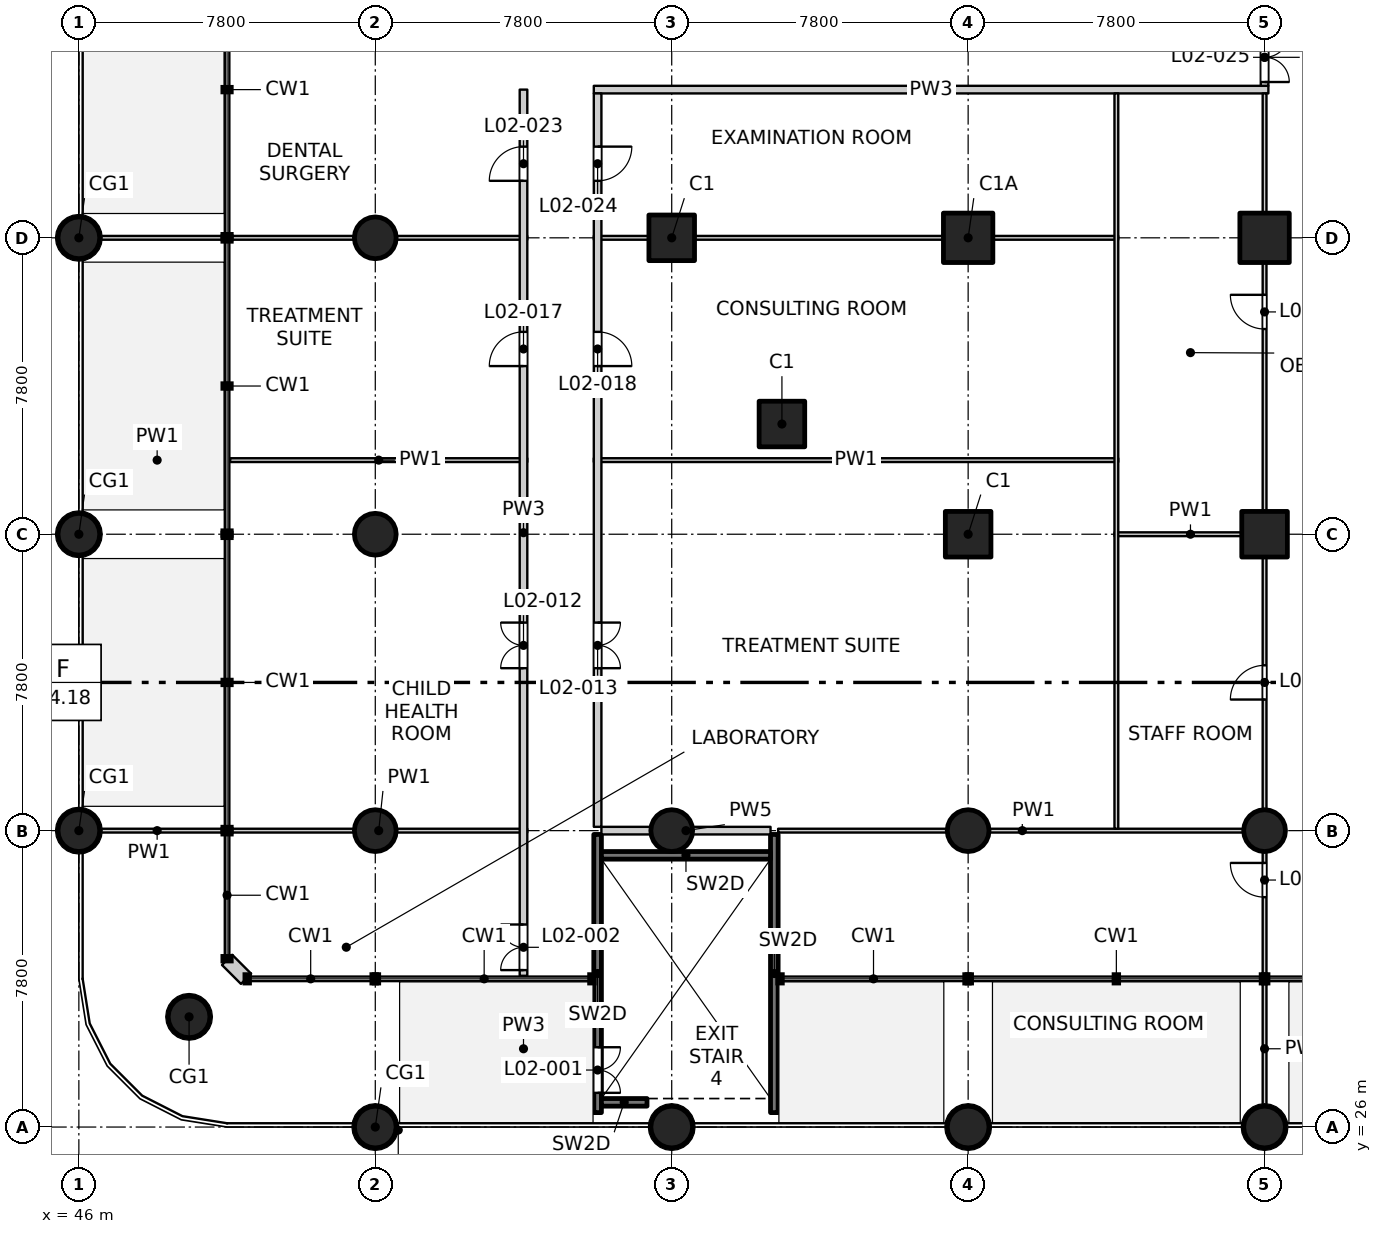
"""IFC4 building model, lengths in metres.
Left out: names, types, materials, properties, quantities, classifications, styles, units other than length and angle.
Written with IfcOpenShell. Run it as: python <this file> out.ifc"""

import sys

from ifc_helpers import new_model, si_unit, direction, frame, frame_2d, origin, origin_2d, place, context, subcontext, project, spatial, rectangle, circle, extrude, element, fill, save


model = new_model("IFC4")
c1 = context("Model", 3, precision=1e-05, world=origin(), true_north=direction((0.0, 1.0)))
c2 = subcontext(c1, "Body", "Model", "MODEL_VIEW")
j1 = project(units=[si_unit("LENGTHUNIT", "METRE"), si_unit("PLANEANGLEUNIT", "RADIAN")], contexts=[c1])
p1 = place(None, origin())
s1 = spatial("IfcSite", under=j1, at=p1, CompositionType="ELEMENT")
p2 = place(p1, origin())
s2 = spatial("IfcBuilding", under=s1, at=p2, CompositionType="ELEMENT")
p3 = place(p2, frame((0.0, 0.0, 10.5)))
s3 = spatial("IfcBuildingStorey", under=s2, at=p3, CompositionType="ELEMENT", Elevation=10.5)
for number, where, z_axis, x_axis in (
    (1, (64.5, 44.5, -0.3), (0.0, 0.0, 1.0), (1.0, 0.0, 0.0)),
    (2, (61.6, 49.4, -0.3), (0.0, 0.0, 1.0), (1.0, 0.0, 0.0)),
    (3, (69.4, 41.6, -0.3), (0.0, 0.0, 1.0), (1.0, 0.0, 0.0)),
    (4, (77.2, 41.6, -0.3), (0.0, 0.0, 1.0), (1.0, 0.0, 0.0)),
):
    element("IfcColumn", number, at=place(p3, frame(where, z_axis=z_axis, x_axis=x_axis)), inside=s3, PredefinedType="COLUMN", context=c2, shape_type="SweptSolid", body=[
        extrude(rectangle(XDim=1.2, YDim=1.2, at=origin_2d()), origin(), (0.0, 0.0, 1.0), 4.45),
    ])
for number, where, z_axis, x_axis in (
    (5, (69.4, 49.4, -0.3), (0.0, 0.0, 1.0), (1.0, 0.0, 0.0)),
    (6, (77.2, 49.4, -0.3), (0.0, 0.0, 1.0), (1.0, 0.0, 0.0)),
):
    element("IfcColumn", number, at=place(p3, frame(where, z_axis=z_axis, x_axis=x_axis)), inside=s3, PredefinedType="COLUMN", context=c2, shape_type="SweptSolid", body=[
        extrude(rectangle(XDim=1.3, YDim=1.3, at=origin_2d()), origin(), (0.0, 0.0, 1.0), 4.45),
    ])
for number, where, z_axis, x_axis in (
    (7, (48.9, 28.9, -0.3), (0.0, 0.0, 1.0), (1.0, 0.0, 0.0)),
    (8, (46.0, 33.8, -0.3), (0.0, 0.0, 1.0), (1.0, 0.0, 0.0)),
    (9, (46.0, 41.6, -0.3), (0.0, 0.0, 1.0), (1.0, 0.0, 0.0)),
    (10, (46.0, 49.4, -0.3), (0.0, 0.0, 1.0), (1.0, 0.0, 0.0)),
    (11, (53.8, 26.0, -0.3), (0.0, 0.0, 1.0), (1.0, 0.0, 0.0)),
    (12, (53.8, 33.8, -0.3), (0.0, 0.0, 1.0), (1.0, 0.0, 0.0)),
    (13, (53.8, 41.6, -0.3), (0.0, 0.0, 1.0), (1.0, 0.0, 0.0)),
    (14, (53.8, 49.4, -0.3), (0.0, 0.0, 1.0), (1.0, 0.0, 0.0)),
    (15, (61.6, 26.0, -0.3), (0.0, 0.0, 1.0), (1.0, 0.0, 0.0)),
    (16, (61.6, 33.8, -0.3), (0.0, 0.0, 1.0), (1.0, 0.0, 0.0)),
    (17, (69.4, 26.0, -0.3), (0.0, 0.0, 1.0), (1.0, 0.0, 0.0)),
    (18, (69.4, 33.8, -0.3), (0.0, 0.0, 1.0), (1.0, 0.0, 0.0)),
    (19, (77.2, 26.0, -0.3), (0.0, 0.0, 1.0), (1.0, 0.0, 0.0)),
    (20, (77.2, 33.8, -0.3), (0.0, 0.0, 1.0), (1.0, 0.0, 0.0)),
):
    element("IfcColumn", number, at=place(p3, frame(where, z_axis=z_axis, x_axis=x_axis)), inside=s3, PredefinedType="COLUMN", context=c2, shape_type="SweptSolid", body=[
        extrude(circle(Radius=0.55, at=origin_2d()), origin(), (0.0, 0.0, 1.0), 4.45),
    ])
p4 = place(p3, frame((59.65, 26.38, 0.0), z_axis=(0.0, 0.0, 1.0), x_axis=(0.0, 1.0, 0.0)))
e21 = element("IfcWall", 21, at=p4, inside=s3, PredefinedType="SOLIDWALL", context=c2, shape_type="SweptSolid", body=[
    extrude(rectangle(XDim=7.32, YDim=0.2, at=frame_2d((3.66, 0.0))), origin(), (0.0, 0.0, 1.0), 4.15),
])
p5 = place(p4, frame((0.52, 0.0, 0.0)))
e22 = element("IfcOpeningElement", 22, at=p5, cuts=e21, PredefinedType="OPENING", context=c2, shape_type="SweptSolid", body=[
    extrude(rectangle(XDim=1.2, YDim=2.1, at=frame_2d((0.6, 1.05))), frame((0.0, 0.11, 0.0), z_axis=(0.0, -1.0, 0.0), x_axis=(1.0, 0.0, 0.0)), (0.0, 0.0, 1.0), 0.22),
])
p6 = place(p3, frame((64.3, 26.38, 0.0), z_axis=(0.0, 0.0, 1.0), x_axis=(0.0, 1.0, 0.0)))
e23 = element("IfcWall", 23, at=p6, inside=s3, PredefinedType="SOLIDWALL", context=c2, shape_type="SweptSolid", body=[
    extrude(rectangle(XDim=7.32, YDim=0.2, at=frame_2d((3.66, 0.0))), origin(), (0.0, 0.0, 1.0), 4.15),
])
p7 = place(p3, frame((59.75, 33.15, 0.0), z_axis=(0.0, 0.0, 1.0), x_axis=(1.0, 0.0, 0.0)))
e24 = element("IfcWall", 24, at=p7, inside=s3, PredefinedType="SOLIDWALL", context=c2, shape_type="SweptSolid", body=[
    extrude(rectangle(XDim=4.45, YDim=0.2, at=frame_2d((2.225, 0.0))), origin(), (0.0, 0.0, 1.0), 4.15),
])
p8 = place(p3, frame((59.75, 26.65, 0.0), z_axis=(0.0, 0.0, 1.0), x_axis=(1.0, 0.0, 0.0)))
e25 = element("IfcWall", 25, at=p8, inside=s3, PredefinedType="SOLIDWALL", context=c2, shape_type="SweptSolid", body=[
    extrude(rectangle(XDim=1.2, YDim=0.2, at=frame_2d((0.6, 0.0))), origin(), (0.0, 0.0, 1.0), 4.15),
])
p9 = place(p3, frame((50.4, 29.9, 0.0), z_axis=(0.0, 0.0, 1.0), x_axis=(-0.707106781187, 0.707106781187, 0.0)))
e26 = element("IfcWall", 26, at=p9, inside=s3, PredefinedType="SOLIDWALL", context=c2, shape_type="SweptSolid", body=[
    extrude(rectangle(XDim=0.707, YDim=0.38, at=frame_2d((0.354, 0.0))), origin(), (0.0, 0.0, 1.0), 3.7),
])
p10 = place(p3, frame((46.3, 33.8, 0.0), z_axis=(0.0, 0.0, 1.0), x_axis=(1.0, 0.0, 0.0)))
e27 = element("IfcWall", 27, at=p10, inside=s3, PredefinedType="PARTITIONING", context=c2, shape_type="SweptSolid", body=[
    extrude(rectangle(XDim=3.52, YDim=0.1, at=frame_2d((1.76, 0.0))), origin(), (0.0, 0.0, 1.0), 4.15),
])
p11 = place(p3, frame((49.98, 33.8, 0.0), z_axis=(0.0, 0.0, 1.0), x_axis=(1.0, 0.0, 0.0)))
e28 = element("IfcWall", 28, at=p11, inside=s3, PredefinedType="PARTITIONING", context=c2, shape_type="SweptSolid", body=[
    extrude(rectangle(XDim=7.82, YDim=0.1, at=frame_2d((3.91, 0.0))), origin(), (0.0, 0.0, 1.0), 4.15),
])
p12 = place(p3, frame((59.75, 33.8, 0.0), z_axis=(0.0, 0.0, 1.0), x_axis=(1.0, 0.0, 0.0)))
e29 = element("IfcWall", 29, at=p12, inside=s3, PredefinedType="PARTITIONING", context=c2, shape_type="SweptSolid", body=[
    extrude(rectangle(XDim=4.45, YDim=0.2, at=frame_2d((2.225, 0.0))), origin(), (0.0, 0.0, 1.0), 4.15),
])
p13 = place(p3, frame((64.4, 33.8, 0.0), z_axis=(0.0, 0.0, 1.0), x_axis=(1.0, 0.0, 0.0)))
e30 = element("IfcWall", 30, at=p13, inside=s3, PredefinedType="PARTITIONING", context=c2, shape_type="SweptSolid", body=[
    extrude(rectangle(XDim=12.85, YDim=0.1, at=frame_2d((6.425, 0.0))), origin(), (0.0, 0.0, 1.0), 4.15),
])
p14 = place(p3, frame((73.25, 41.6, 0.0), z_axis=(0.0, 0.0, 1.0), x_axis=(1.0, 0.0, 0.0)))
e31 = element("IfcWall", 31, at=p14, inside=s3, PredefinedType="PARTITIONING", context=c2, shape_type="SweptSolid", body=[
    extrude(rectangle(XDim=4.0, YDim=0.1, at=frame_2d((2.0, 0.0))), origin(), (0.0, 0.0, 1.0), 3.7),
])
p15 = place(p3, frame((46.3, 43.55, 0.0), z_axis=(0.0, 0.0, 1.0), x_axis=(1.0, 0.0, 0.0)))
e32 = element("IfcWall", 32, at=p15, inside=s3, PredefinedType="PARTITIONING", context=c2, shape_type="SweptSolid", body=[
    extrude(rectangle(XDim=3.52, YDim=0.1, at=frame_2d((1.76, 0.0))), origin(), (0.0, 0.0, 1.0), 4.15),
])
p16 = place(p3, frame((49.98, 43.55, 0.0), z_axis=(0.0, 0.0, 1.0), x_axis=(1.0, 0.0, 0.0)))
e33 = element("IfcWall", 33, at=p16, inside=s3, PredefinedType="PARTITIONING", context=c2, shape_type="SweptSolid", body=[
    extrude(rectangle(XDim=7.82, YDim=0.1, at=frame_2d((3.91, 0.0))), origin(), (0.0, 0.0, 1.0), 4.15),
])
p17 = place(p3, frame((59.55, 43.55, 0.0), z_axis=(0.0, 0.0, 1.0), x_axis=(1.0, 0.0, 0.0)))
e34 = element("IfcWall", 34, at=p17, inside=s3, PredefinedType="PARTITIONING", context=c2, shape_type="SweptSolid", body=[
    extrude(rectangle(XDim=13.8, YDim=0.1, at=frame_2d((6.9, 0.0))), origin(), (0.0, 0.0, 1.0), 4.15),
])
p18 = place(p3, frame((46.3, 49.4, 0.0), z_axis=(0.0, 0.0, 1.0), x_axis=(1.0, 0.0, 0.0)))
e35 = element("IfcWall", 35, at=p18, inside=s3, PredefinedType="PARTITIONING", context=c2, shape_type="SweptSolid", body=[
    extrude(rectangle(XDim=3.52, YDim=0.1, at=frame_2d((1.76, 0.0))), origin(), (0.0, 0.0, 1.0), 4.15),
])
p19 = place(p3, frame((49.98, 49.4, 0.0), z_axis=(0.0, 0.0, 1.0), x_axis=(1.0, 0.0, 0.0)))
e36 = element("IfcWall", 36, at=p19, inside=s3, PredefinedType="PARTITIONING", context=c2, shape_type="SweptSolid", body=[
    extrude(rectangle(XDim=7.82, YDim=0.1, at=frame_2d((3.91, 0.0))), origin(), (0.0, 0.0, 1.0), 4.15),
])
p20 = place(p3, frame((59.55, 49.4, 0.0), z_axis=(0.0, 0.0, 1.0), x_axis=(1.0, 0.0, 0.0)))
e37 = element("IfcWall", 37, at=p20, inside=s3, PredefinedType="PARTITIONING", context=c2, shape_type="SweptSolid", body=[
    extrude(rectangle(XDim=13.8, YDim=0.1, at=frame_2d((6.9, 0.0))), origin(), (0.0, 0.0, 1.0), 4.15),
])
p21 = place(p3, frame((59.55, 53.3, 0.0), z_axis=(0.0, 0.0, 1.0), x_axis=(1.0, 0.0, 0.0)))
e38 = element("IfcWall", 38, at=p21, inside=s3, PredefinedType="PARTITIONING", context=c2, shape_type="SweptSolid", body=[
    extrude(rectangle(XDim=17.75, YDim=0.2, at=frame_2d((8.875, 0.0))), origin(), (0.0, 0.0, 1.0), 4.15),
])
p22 = place(p3, frame((57.7, 26.3, 0.0), z_axis=(0.0, 0.0, 1.0), x_axis=(0.0, 1.0, 0.0)))
e39 = element("IfcWall", 39, at=p22, inside=s3, PredefinedType="PARTITIONING", context=c2, shape_type="SweptSolid", body=[
    extrude(rectangle(XDim=3.52, YDim=0.2, at=frame_2d((1.76, 0.0))), origin(), (0.0, 0.0, 1.0), 4.15),
])
p23 = place(p3, frame((57.7, 29.98, 0.0), z_axis=(0.0, 0.0, 1.0), x_axis=(0.0, 1.0, 0.0)))
e40 = element("IfcWall", 40, at=p23, inside=s3, PredefinedType="PARTITIONING", context=c2, shape_type="SweptSolid", body=[
    extrude(rectangle(XDim=23.32, YDim=0.2, at=frame_2d((11.66, 0.0))), origin(), (0.0, 0.0, 1.0), 4.15),
])
p24 = place(p23, frame((0.15, 0.0, 0.0)))
e41 = element("IfcOpeningElement", 41, at=p24, cuts=e40, PredefinedType="OPENING", context=c2, shape_type="SweptSolid", body=[
    extrude(rectangle(XDim=1.2, YDim=2.1, at=frame_2d((0.6, 1.05))), frame((0.0, 0.11, 0.0), z_axis=(0.0, -1.0, 0.0), x_axis=(1.0, 0.0, 0.0)), (0.0, 0.0, 1.0), 0.22),
])
p25 = place(p23, frame((8.095, 0.0, 0.0)))
e42 = element("IfcOpeningElement", 42, at=p25, cuts=e40, PredefinedType="OPENING", context=c2, shape_type="SweptSolid", body=[
    extrude(rectangle(XDim=1.2, YDim=2.1, at=frame_2d((0.6, 1.05))), frame((0.0, 0.11, 0.0), z_axis=(0.0, -1.0, 0.0), x_axis=(1.0, 0.0, 0.0)), (0.0, 0.0, 1.0), 0.22),
])
p26 = place(p23, frame((16.045, 0.0, 0.0)))
e43 = element("IfcOpeningElement", 43, at=p26, cuts=e40, PredefinedType="OPENING", context=c2, shape_type="SweptSolid", body=[
    extrude(rectangle(XDim=0.9, YDim=2.1, at=frame_2d((0.45, 1.05))), frame((0.0, 0.11, 0.0), z_axis=(0.0, -1.0, 0.0), x_axis=(1.0, 0.0, 0.0)), (0.0, 0.0, 1.0), 0.22),
])
p27 = place(p23, frame((20.92, 0.0, 0.0)))
e44 = element("IfcOpeningElement", 44, at=p27, cuts=e40, PredefinedType="OPENING", context=c2, shape_type="SweptSolid", body=[
    extrude(rectangle(XDim=0.9, YDim=2.1, at=frame_2d((0.45, 1.05))), frame((0.0, 0.11, 0.0), z_axis=(0.0, -1.0, 0.0), x_axis=(1.0, 0.0, 0.0)), (0.0, 0.0, 1.0), 0.22),
])
p28 = place(p3, frame((59.65, 33.9, 0.0), z_axis=(0.0, 0.0, 1.0), x_axis=(0.0, 1.0, 0.0)))
e45 = element("IfcWall", 45, at=p28, inside=s3, PredefinedType="PARTITIONING", context=c2, shape_type="SweptSolid", body=[
    extrude(rectangle(XDim=19.3, YDim=0.2, at=frame_2d((9.65, 0.0))), origin(), (0.0, 0.0, 1.0), 4.15),
])
p29 = place(p28, frame((4.175, 0.0, 0.0)))
e46 = element("IfcOpeningElement", 46, at=p29, cuts=e45, PredefinedType="OPENING", context=c2, shape_type="SweptSolid", body=[
    extrude(rectangle(XDim=1.2, YDim=2.1, at=frame_2d((0.6, 1.05))), frame((0.0, 0.11, 0.0), z_axis=(0.0, -1.0, 0.0), x_axis=(1.0, 0.0, 0.0)), (0.0, 0.0, 1.0), 0.22),
])
p30 = place(p28, frame((12.125, 0.0, 0.0)))
e47 = element("IfcOpeningElement", 47, at=p30, cuts=e45, PredefinedType="OPENING", context=c2, shape_type="SweptSolid", body=[
    extrude(rectangle(XDim=0.9, YDim=2.1, at=frame_2d((0.45, 1.05))), frame((0.0, 0.11, 0.0), z_axis=(0.0, -1.0, 0.0), x_axis=(1.0, 0.0, 0.0)), (0.0, 0.0, 1.0), 0.22),
])
p31 = place(p28, frame((17.0, 0.0, 0.0)))
e48 = element("IfcOpeningElement", 48, at=p31, cuts=e45, PredefinedType="OPENING", context=c2, shape_type="SweptSolid", body=[
    extrude(rectangle(XDim=0.9, YDim=2.1, at=frame_2d((0.45, 1.05))), frame((0.0, 0.11, 0.0), z_axis=(0.0, -1.0, 0.0), x_axis=(1.0, 0.0, 0.0)), (0.0, 0.0, 1.0), 0.22),
])
p32 = place(p3, frame((73.3, 33.85, 0.0), z_axis=(0.0, 0.0, 1.0), x_axis=(0.0, 1.0, 0.0)))
e49 = element("IfcWall", 49, at=p32, inside=s3, PredefinedType="PARTITIONING", context=c2, shape_type="SweptSolid", body=[
    extrude(rectangle(XDim=19.35, YDim=0.1, at=frame_2d((9.675, 0.0))), origin(), (0.0, 0.0, 1.0), 4.15),
])
p33 = place(p3, frame((77.2, 26.3, 0.0), z_axis=(0.0, 0.0, 1.0), x_axis=(0.0, 1.0, 0.0)))
e50 = element("IfcWall", 50, at=p33, inside=s3, PredefinedType="PARTITIONING", context=c2, shape_type="SweptSolid", body=[
    extrude(rectangle(XDim=3.52, YDim=0.1, at=frame_2d((1.76, 0.0))), origin(), (0.0, 0.0, 1.0), 4.15),
])
p34 = place(p3, frame((77.2, 29.98, 0.0), z_axis=(0.0, 0.0, 1.0), x_axis=(0.0, 1.0, 0.0)))
e51 = element("IfcWall", 51, at=p34, inside=s3, PredefinedType="PARTITIONING", context=c2, shape_type="SweptSolid", body=[
    extrude(rectangle(XDim=23.22, YDim=0.1, at=frame_2d((11.61, 0.0))), origin(), (0.0, 0.0, 1.0), 4.15),
])
p35 = place(p34, frame((2.07, 0.0, 0.0)))
e52 = element("IfcOpeningElement", 52, at=p35, cuts=e51, PredefinedType="OPENING", context=c2, shape_type="SweptSolid", body=[
    extrude(rectangle(XDim=0.9, YDim=2.1, at=frame_2d((0.45, 1.05))), frame((0.0, 0.06, 0.0), z_axis=(0.0, -1.0, 0.0), x_axis=(1.0, 0.0, 0.0)), (0.0, 0.0, 1.0), 0.12),
])
p36 = place(p34, frame((7.27, 0.0, 0.0)))
e53 = element("IfcOpeningElement", 53, at=p36, cuts=e51, PredefinedType="OPENING", context=c2, shape_type="SweptSolid", body=[
    extrude(rectangle(XDim=0.9, YDim=2.1, at=frame_2d((0.45, 1.05))), frame((0.0, 0.06, 0.0), z_axis=(0.0, -1.0, 0.0), x_axis=(1.0, 0.0, 0.0)), (0.0, 0.0, 1.0), 0.12),
])
p37 = place(p34, frame((17.02, 0.0, 0.0)))
e54 = element("IfcOpeningElement", 54, at=p37, cuts=e51, PredefinedType="OPENING", context=c2, shape_type="SweptSolid", body=[
    extrude(rectangle(XDim=0.9, YDim=2.1, at=frame_2d((0.45, 1.05))), frame((0.0, 0.06, 0.0), z_axis=(0.0, -1.0, 0.0), x_axis=(1.0, 0.0, 0.0)), (0.0, 0.0, 1.0), 0.12),
])
p38 = place(p3, frame((77.2, 53.4, 0.0), z_axis=(0.0, 0.0, 1.0), x_axis=(0.0, 1.0, 0.0)))
e55 = element("IfcWall", 55, at=p38, inside=s3, PredefinedType="PARTITIONING", context=c2, shape_type="SweptSolid", body=[
    extrude(rectangle(XDim=1.5, YDim=0.2, at=frame_2d((0.75, 0.0))), origin(), (0.0, 0.0, 1.0), 4.15),
])
p39 = place(p38, frame((0.1, 0.0, 0.0)))
e56 = element("IfcOpeningElement", 56, at=p39, cuts=e55, PredefinedType="OPENING", context=c2, shape_type="SweptSolid", body=[
    extrude(rectangle(XDim=1.3, YDim=2.1, at=frame_2d((0.65, 1.05))), frame((0.0, 0.11, 0.0), z_axis=(0.0, -1.0, 0.0), x_axis=(1.0, 0.0, 0.0)), (0.0, 0.0, 1.0), 0.22),
])
p40 = place(p5, origin())
e57 = element("IfcDoor", 57, at=p40, inside=s3, OperationType="DOUBLE_DOOR_SINGLE_SWING", PredefinedType="DOOR", context=c2, shape_type="SweptSolid", body=[
    extrude(rectangle(XDim=1.2, YDim=2.1, at=frame_2d((0.6, 1.05))), frame((0.0, 0.025, 0.0), z_axis=(0.0, -1.0, 0.0), x_axis=(1.0, 0.0, 0.0)), (0.0, 0.0, 1.0), 0.05),
])
fill(e22, e57)
p41 = place(p24, origin())
e58 = element("IfcDoor", 58, at=p41, inside=s3, OperationType="DOUBLE_DOOR_SINGLE_SWING", PredefinedType="DOOR", context=c2, shape_type="SweptSolid", body=[
    extrude(rectangle(XDim=1.2, YDim=2.1, at=frame_2d((0.6, 1.05))), frame((0.0, 0.025, 0.0), z_axis=(0.0, -1.0, 0.0), x_axis=(1.0, 0.0, 0.0)), (0.0, 0.0, 1.0), 0.05),
])
fill(e41, e58)
p42 = place(p35, origin())
e59 = element("IfcDoor", 59, at=p42, inside=s3, OperationType="SINGLE_SWING_RIGHT", PredefinedType="DOOR", context=c2, shape_type="SweptSolid", body=[
    extrude(rectangle(XDim=0.9, YDim=2.1, at=frame_2d((0.45, 1.05))), frame((0.0, 0.025, 0.0), z_axis=(0.0, -1.0, 0.0), x_axis=(1.0, 0.0, 0.0)), (0.0, 0.0, 1.0), 0.05),
])
fill(e52, e59)
p43 = place(p36, origin())
e60 = element("IfcDoor", 60, at=p43, inside=s3, OperationType="SINGLE_SWING_LEFT", PredefinedType="DOOR", context=c2, shape_type="SweptSolid", body=[
    extrude(rectangle(XDim=0.9, YDim=2.1, at=frame_2d((0.45, 1.05))), frame((0.0, 0.025, 0.0), z_axis=(0.0, -1.0, 0.0), x_axis=(1.0, 0.0, 0.0)), (0.0, 0.0, 1.0), 0.05),
])
fill(e53, e60)
p44 = place(p25, origin())
e61 = element("IfcDoor", 61, at=p44, inside=s3, OperationType="DOUBLE_DOOR_SINGLE_SWING", PredefinedType="DOOR", context=c2, shape_type="SweptSolid", body=[
    extrude(rectangle(XDim=1.2, YDim=2.1, at=frame_2d((0.6, 1.05))), frame((0.0, 0.025, 0.0), z_axis=(0.0, -1.0, 0.0), x_axis=(1.0, 0.0, 0.0)), (0.0, 0.0, 1.0), 0.05),
])
fill(e42, e61)
p45 = place(p29, origin())
e62 = element("IfcDoor", 62, at=p45, inside=s3, OperationType="DOUBLE_DOOR_SINGLE_SWING", PredefinedType="DOOR", context=c2, shape_type="SweptSolid", body=[
    extrude(rectangle(XDim=1.2, YDim=2.1, at=frame_2d((0.6, 1.05))), frame((0.0, 0.025, 0.0), z_axis=(0.0, -1.0, 0.0), x_axis=(1.0, 0.0, 0.0)), (0.0, 0.0, 1.0), 0.05),
])
fill(e46, e62)
p46 = place(p26, origin())
e63 = element("IfcDoor", 63, at=p46, inside=s3, OperationType="SINGLE_SWING_LEFT", PredefinedType="DOOR", context=c2, shape_type="SweptSolid", body=[
    extrude(rectangle(XDim=0.9, YDim=2.1, at=frame_2d((0.45, 1.05))), frame((0.0, 0.025, 0.0), z_axis=(0.0, -1.0, 0.0), x_axis=(1.0, 0.0, 0.0)), (0.0, 0.0, 1.0), 0.05),
])
fill(e43, e63)
p47 = place(p30, origin())
e64 = element("IfcDoor", 64, at=p47, inside=s3, OperationType="SINGLE_SWING_RIGHT", PredefinedType="DOOR", context=c2, shape_type="SweptSolid", body=[
    extrude(rectangle(XDim=0.9, YDim=2.1, at=frame_2d((0.45, 1.05))), frame((0.0, 0.025, 0.0), z_axis=(0.0, -1.0, 0.0), x_axis=(1.0, 0.0, 0.0)), (0.0, 0.0, 1.0), 0.05),
])
fill(e47, e64)
p48 = place(p37, origin())
e65 = element("IfcDoor", 65, at=p48, inside=s3, OperationType="SINGLE_SWING_RIGHT", PredefinedType="DOOR", context=c2, shape_type="SweptSolid", body=[
    extrude(rectangle(XDim=0.9, YDim=2.1, at=frame_2d((0.45, 1.05))), frame((0.0, 0.025, 0.0), z_axis=(0.0, -1.0, 0.0), x_axis=(1.0, 0.0, 0.0)), (0.0, 0.0, 1.0), 0.05),
])
fill(e54, e65)
p49 = place(p27, origin())
e66 = element("IfcDoor", 66, at=p49, inside=s3, OperationType="SINGLE_SWING_LEFT", PredefinedType="DOOR", context=c2, shape_type="SweptSolid", body=[
    extrude(rectangle(XDim=0.9, YDim=2.1, at=frame_2d((0.45, 1.05))), frame((0.0, 0.025, 0.0), z_axis=(0.0, -1.0, 0.0), x_axis=(1.0, 0.0, 0.0)), (0.0, 0.0, 1.0), 0.05),
])
fill(e44, e66)
p50 = place(p31, origin())
e67 = element("IfcDoor", 67, at=p50, inside=s3, OperationType="SINGLE_SWING_LEFT", PredefinedType="DOOR", context=c2, shape_type="SweptSolid", body=[
    extrude(rectangle(XDim=0.9, YDim=2.1, at=frame_2d((0.45, 1.05))), frame((0.0, 0.025, 0.0), z_axis=(0.0, -1.0, 0.0), x_axis=(1.0, 0.0, 0.0)), (0.0, 0.0, 1.0), 0.05),
])
fill(e48, e67)
p51 = place(p39, origin())
e68 = element("IfcDoor", 68, at=p51, inside=s3, OperationType="DOUBLE_DOOR_SINGLE_SWING", PredefinedType="DOOR", context=c2, shape_type="SweptSolid", body=[
    extrude(rectangle(XDim=1.3, YDim=2.1, at=frame_2d((0.65, 1.05))), frame((0.0, 0.025, 0.0), z_axis=(0.0, -1.0, 0.0), x_axis=(1.0, 0.0, 0.0)), (0.0, 0.0, 1.0), 0.05),
])
fill(e56, e68)
save(model, sys.argv[1])
